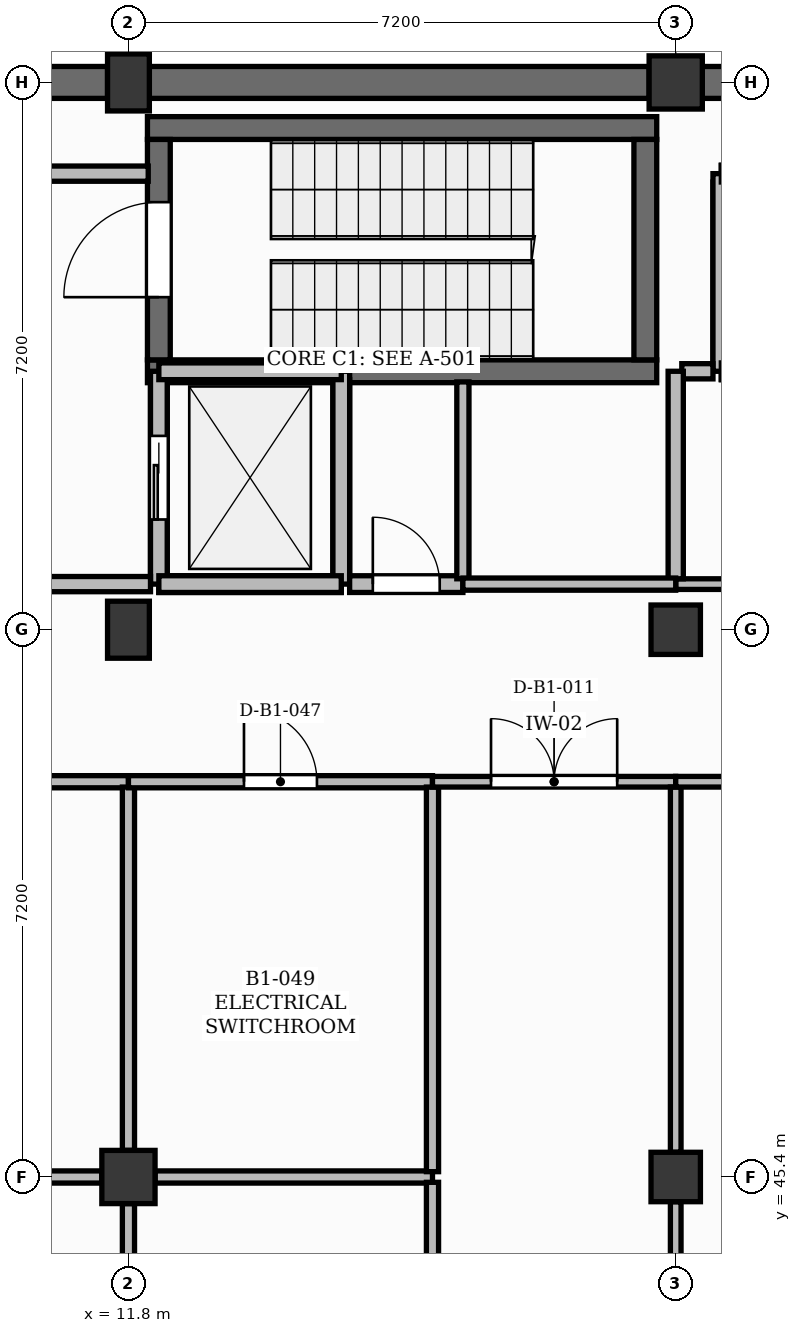
"""IFC4 building model, lengths in metres.
Left out: names, types, materials, properties, quantities, classifications, styles, units other than length and angle.
Written with IfcOpenShell. Run it as: python <this file> out.ifc"""

import sys

from ifc_helpers import new_model, si_unit, direction, frame, frame_2d, origin, origin_2d, place, context, subcontext, project, spatial, rectangle, extrude, element, fill, save


model = new_model("IFC4")
c1 = context("Model", 3, precision=1e-05, world=origin(), true_north=direction((0.0, 1.0)))
c2 = subcontext(c1, "Body", "Model", "MODEL_VIEW")
j1 = project(units=[si_unit("LENGTHUNIT", "METRE"), si_unit("PLANEANGLEUNIT", "RADIAN")], contexts=[c1])
p1 = place(None, origin())
s1 = spatial("IfcSite", under=j1, at=p1, CompositionType="ELEMENT")
p2 = place(p1, origin())
s2 = spatial("IfcBuilding", under=s1, at=p2, CompositionType="ELEMENT")
p3 = place(p2, frame((0.0, 0.0, -4.5)))
s3 = spatial("IfcBuildingStorey", under=s2, at=p3, CompositionType="ELEMENT", Elevation=-4.5)
p4 = place(p3, frame((11.8, 45.4, 0.0), z_axis=(0.0, 0.0, 1.0), x_axis=(1.0, 0.0, 0.0)))
e1 = element("IfcColumn", 1, at=p4, inside=s3, PredefinedType="COLUMN", context=c2, shape_type="SweptSolid", body=[
    extrude(rectangle(XDim=0.7, YDim=0.7, at=origin_2d()), origin(), (0.0, 0.0, 1.0), 4.2),
])
for number, where, z_axis, x_axis in (
    (2, (11.8, 52.6, 0.0), (0.0, 0.0, 1.0), (1.0, 0.0, 0.0)),
    (3, (11.8, 59.8, 0.0), (0.0, 0.0, 1.0), (1.0, 0.0, 0.0)),
):
    element("IfcColumn", number, at=place(p3, frame(where, z_axis=z_axis, x_axis=x_axis)), inside=s3, PredefinedType="COLUMN", context=c2, shape_type="SweptSolid", body=[
        extrude(rectangle(XDim=0.55, YDim=0.75, at=origin_2d()), origin(), (0.0, 0.0, 1.0), 4.2),
    ])
for number, where, z_axis, x_axis in (
    (4, (19.0, 45.4, 0.0), (0.0, 0.0, 1.0), (1.0, 0.0, 0.0)),
    (5, (19.0, 52.6, 0.0), (0.0, 0.0, 1.0), (1.0, 0.0, 0.0)),
):
    element("IfcColumn", number, at=place(p3, frame(where, z_axis=z_axis, x_axis=x_axis)), inside=s3, PredefinedType="COLUMN", context=c2, shape_type="SweptSolid", body=[
        extrude(rectangle(XDim=0.65, YDim=0.65, at=origin_2d()), origin(), (0.0, 0.0, 1.0), 4.2),
    ])
p5 = place(p3, frame((19.0, 59.8, 0.0), z_axis=(0.0, 0.0, 1.0), x_axis=(1.0, 0.0, 0.0)))
e6 = element("IfcColumn", 6, at=p5, inside=s3, PredefinedType="COLUMN", context=c2, shape_type="SweptSolid", body=[
    extrude(rectangle(XDim=0.7, YDim=0.7, at=origin_2d()), origin(), (0.0, 0.0, 1.0), 4.2),
])
p6 = place(p3, frame((8.4, 59.8, 0.0), z_axis=(0.0, 0.0, 1.0), x_axis=(1.0, 0.0, 0.0)))
e7 = element("IfcWall", 7, at=p6, inside=s3, PredefinedType="USERDEFINED", context=c2, shape_type="SweptSolid", body=[
    extrude(rectangle(XDim=3.125, YDim=0.42, at=frame_2d((1.562, 0.0))), origin(), (0.0, 0.0, 1.0), 4.2),
])
p7 = place(p3, frame((12.075, 59.8, 0.0), z_axis=(0.0, 0.0, 1.0), x_axis=(1.0, 0.0, 0.0)))
e8 = element("IfcWall", 8, at=p7, inside=s3, PredefinedType="USERDEFINED", context=c2, shape_type="SweptSolid", body=[
    extrude(rectangle(XDim=6.575, YDim=0.42, at=frame_2d((3.288, 0.0))), origin(), (0.0, 0.0, 1.0), 4.2),
])
p8 = place(p3, frame((19.35, 59.8, 0.0), z_axis=(0.0, 0.0, 1.0), x_axis=(1.0, 0.0, 0.0)))
e9 = element("IfcWall", 9, at=p8, inside=s3, PredefinedType="USERDEFINED", context=c2, shape_type="SweptSolid", body=[
    extrude(rectangle(XDim=3.05, YDim=0.42, at=frame_2d((1.525, 0.0))), origin(), (0.0, 0.0, 1.0), 4.2),
])
for number, where, z_axis, x_axis in (
    (10, (12.05, 56.0, 0.0), (0.0, 0.0, 1.0), (1.0, 0.0, 0.0)),
    (11, (12.05, 59.2, 0.0), (0.0, 0.0, 1.0), (1.0, 0.0, 0.0)),
):
    element("IfcWall", number, at=place(p3, frame(where, z_axis=z_axis, x_axis=x_axis)), inside=s3, PredefinedType="SHEAR", context=c2, shape_type="SweptSolid", body=[
        extrude(rectangle(XDim=6.7, YDim=0.3, at=frame_2d((3.35, 0.0))), origin(), (0.0, 0.0, 1.0), 4.25),
    ])
p9 = place(p3, frame((12.2, 56.15, 0.0), z_axis=(0.0, 0.0, 1.0), x_axis=(0.0, 1.0, 0.0)))
e12 = element("IfcWall", 12, at=p9, inside=s3, PredefinedType="SHEAR", context=c2, shape_type="SweptSolid", body=[
    extrude(rectangle(XDim=2.9, YDim=0.3, at=frame_2d((1.45, 0.0))), origin(), (0.0, 0.0, 1.0), 4.25),
])
p10 = place(p9, frame((0.825, 0.0, 0.0)))
e13 = element("IfcOpeningElement", 13, at=p10, cuts=e12, PredefinedType="OPENING", context=c2, shape_type="SweptSolid", body=[
    extrude(rectangle(XDim=1.25, YDim=2.15, at=frame_2d((0.625, 1.075))), frame((0.0, 0.16, 0.0), z_axis=(0.0, -1.0, 0.0), x_axis=(1.0, 0.0, 0.0)), (0.0, 0.0, 1.0), 0.32),
])
p11 = place(p3, frame((18.6, 56.15, 0.0), z_axis=(0.0, 0.0, 1.0), x_axis=(0.0, 1.0, 0.0)))
e14 = element("IfcWall", 14, at=p11, inside=s3, PredefinedType="SHEAR", context=c2, shape_type="SweptSolid", body=[
    extrude(rectangle(XDim=2.9, YDim=0.3, at=frame_2d((1.45, 0.0))), origin(), (0.0, 0.0, 1.0), 4.25),
])
p12 = place(p3, frame((12.2, 53.2, 0.0), z_axis=(0.0, 0.0, 1.0), x_axis=(1.0, 0.0, 0.0)))
e15 = element("IfcWall", 15, at=p12, inside=s3, PredefinedType="SOLIDWALL", context=c2, shape_type="SweptSolid", body=[
    extrude(rectangle(XDim=2.4, YDim=0.22, at=frame_2d((1.2, 0.0))), origin(), (0.0, 0.0, 1.0), 4.25),
])
p13 = place(p3, frame((12.2, 53.31, 0.0), z_axis=(0.0, 0.0, 1.0), x_axis=(0.0, 1.0, 0.0)))
e16 = element("IfcWall", 16, at=p13, inside=s3, PredefinedType="SOLIDWALL", context=c2, shape_type="SweptSolid", body=[
    extrude(rectangle(XDim=2.58, YDim=0.22, at=frame_2d((1.29, 0.0))), origin(), (0.0, 0.0, 1.0), 4.25),
])
p14 = place(p13, frame((0.74, 0.0, 0.0)))
e17 = element("IfcOpeningElement", 17, at=p14, cuts=e16, PredefinedType="OPENING", context=c2, shape_type="SweptSolid", body=[
    extrude(rectangle(XDim=1.1, YDim=2.15, at=frame_2d((0.55, 1.075))), frame((0.0, 0.12, 0.0), z_axis=(0.0, -1.0, 0.0), x_axis=(1.0, 0.0, 0.0)), (0.0, 0.0, 1.0), 0.24),
])
p15 = place(p3, frame((14.6, 53.31, 0.0), z_axis=(0.0, 0.0, 1.0), x_axis=(0.0, 1.0, 0.0)))
e18 = element("IfcWall", 18, at=p15, inside=s3, PredefinedType="SOLIDWALL", context=c2, shape_type="SweptSolid", body=[
    extrude(rectangle(XDim=2.58, YDim=0.22, at=frame_2d((1.29, 0.0))), origin(), (0.0, 0.0, 1.0), 4.25),
])
for number, where, z_axis, x_axis in (
    (19, (12.2, 53.2, -0.9), (0.0, 0.0, 1.0), (0.0, 1.0, 0.0)),
    (20, (14.6, 53.2, -0.9), (0.0, 0.0, 1.0), (0.0, 1.0, 0.0)),
):
    element("IfcWall", number, at=place(p3, frame(where, z_axis=z_axis, x_axis=x_axis)), inside=s3, PredefinedType="SOLIDWALL", context=c2, shape_type="SweptSolid", body=[
        extrude(rectangle(XDim=2.8, YDim=0.22, at=frame_2d((1.4, 0.0))), origin(), (0.0, 0.0, 1.0), 0.9),
    ])
for number, where, z_axis, x_axis in (
    (21, (12.2, 53.2, -0.9), (0.0, 0.0, 1.0), (1.0, 0.0, 0.0)),
    (22, (12.2, 56.0, -0.9), (0.0, 0.0, 1.0), (1.0, 0.0, 0.0)),
):
    element("IfcWall", number, at=place(p3, frame(where, z_axis=z_axis, x_axis=x_axis)), inside=s3, PredefinedType="SOLIDWALL", context=c2, shape_type="SweptSolid", body=[
        extrude(rectangle(XDim=2.4, YDim=0.22, at=frame_2d((1.2, 0.0))), origin(), (0.0, 0.0, 1.0), 0.9),
    ])
p16 = place(p3, frame((19.6, 56.11, 0.0), z_axis=(0.0, 0.0, 1.0), x_axis=(0.0, 1.0, 0.0)))
e23 = element("IfcWall", 23, at=p16, inside=s3, PredefinedType="SOLIDWALL", context=c2, shape_type="SweptSolid", body=[
    extrude(rectangle(XDim=2.38, YDim=0.22, at=frame_2d((1.19, 0.0))), origin(), (0.0, 0.0, 1.0), 4.25),
])
p17 = place(p3, frame((19.6, 56.0, -0.9), z_axis=(0.0, 0.0, 1.0), x_axis=(0.0, 1.0, 0.0)))
e24 = element("IfcWall", 24, at=p17, inside=s3, PredefinedType="SOLIDWALL", context=c2, shape_type="SweptSolid", body=[
    extrude(rectangle(XDim=2.6, YDim=0.22, at=frame_2d((1.3, 0.0))), origin(), (0.0, 0.0, 1.0), 0.9),
])
p18 = place(p3, frame((4.925, 45.4, 0.0), z_axis=(0.0, 0.0, 1.0), x_axis=(1.0, 0.0, 0.0)))
e25 = element("IfcWall", 25, at=p18, inside=s3, PredefinedType="PARTITIONING", context=c2, shape_type="SweptSolid", body=[
    extrude(rectangle(XDim=6.525, YDim=0.16, at=frame_2d((3.262, 0.0))), origin(), (0.0, 0.0, 1.0), 3.6),
])
p19 = place(p3, frame((4.6, 50.6, 0.0), z_axis=(0.0, 0.0, 1.0), x_axis=(1.0, 0.0, 0.0)))
e26 = element("IfcWall", 26, at=p19, inside=s3, PredefinedType="PARTITIONING", context=c2, shape_type="SweptSolid", body=[
    extrude(rectangle(XDim=7.2, YDim=0.16, at=frame_2d((3.6, 0.0))), origin(), (0.0, 0.0, 1.0), 4.08),
])
p20 = place(p19, frame((3.12, 0.0, 0.0)))
e27 = element("IfcOpeningElement", 27, at=p20, cuts=e26, PredefinedType="OPENING", context=c2, shape_type="SweptSolid", body=[
    extrude(rectangle(XDim=0.96, YDim=2.1, at=frame_2d((0.48, 1.05))), frame((0.0, 0.09, 0.0), z_axis=(0.0, -1.0, 0.0), x_axis=(1.0, 0.0, 0.0)), (0.0, 0.0, 1.0), 0.18),
])
p21 = place(p3, frame((7.8, 53.2, 0.0), z_axis=(0.0, 0.0, 1.0), x_axis=(1.0, 0.0, 0.0)))
e28 = element("IfcWall", 28, at=p21, inside=s3, PredefinedType="PARTITIONING", context=c2, shape_type="SweptSolid", body=[
    extrude(rectangle(XDim=4.29, YDim=0.2, at=frame_2d((2.145, 0.0))), origin(), (0.0, 0.0, 1.0), 4.08),
])
p22 = place(p21, frame((1.405, 0.0, 0.0)))
e29 = element("IfcOpeningElement", 29, at=p22, cuts=e28, PredefinedType="OPENING", context=c2, shape_type="SweptSolid", body=[
    extrude(rectangle(XDim=1.48, YDim=2.25, at=frame_2d((0.74, 1.125))), frame((0.0, 0.11, 0.0), z_axis=(0.0, -1.0, 0.0), x_axis=(1.0, 0.0, 0.0)), (0.0, 0.0, 1.0), 0.22),
])
p23 = place(p3, frame((11.8, 38.52, 0.0), z_axis=(0.0, 0.0, 1.0), x_axis=(0.0, 1.0, 0.0)))
e30 = element("IfcWall", 30, at=p23, inside=s3, PredefinedType="PARTITIONING", context=c2, shape_type="SweptSolid", body=[
    extrude(rectangle(XDim=6.53, YDim=0.16, at=frame_2d((3.265, 0.0))), origin(), (0.0, 0.0, 1.0), 3.5),
])
p24 = place(p3, frame((11.8, 45.75, 0.0), z_axis=(0.0, 0.0, 1.0), x_axis=(0.0, 1.0, 0.0)))
e31 = element("IfcWall", 31, at=p24, inside=s3, PredefinedType="PARTITIONING", context=c2, shape_type="SweptSolid", body=[
    extrude(rectangle(XDim=4.78, YDim=0.16, at=frame_2d((2.39, 0.0))), origin(), (0.0, 0.0, 1.0), 3.5),
])
p25 = place(p3, frame((12.15, 45.4, 0.0), z_axis=(0.0, 0.0, 1.0), x_axis=(1.0, 0.0, 0.0)))
e32 = element("IfcWall", 32, at=p25, inside=s3, PredefinedType="PARTITIONING", context=c2, shape_type="SweptSolid", body=[
    extrude(rectangle(XDim=3.65, YDim=0.16, at=frame_2d((1.825, 0.0))), origin(), (0.0, 0.0, 1.0), 3.6),
])
p26 = place(p3, frame((11.8, 50.6, 0.0), z_axis=(0.0, 0.0, 1.0), x_axis=(1.0, 0.0, 0.0)))
e33 = element("IfcWall", 33, at=p26, inside=s3, PredefinedType="PARTITIONING", context=c2, shape_type="SweptSolid", body=[
    extrude(rectangle(XDim=4.0, YDim=0.16, at=frame_2d((2.0, 0.0))), origin(), (0.0, 0.0, 1.0), 4.08),
])
p27 = place(p26, frame((1.52, 0.0, 0.0)))
e34 = element("IfcOpeningElement", 34, at=p27, cuts=e33, PredefinedType="OPENING", context=c2, shape_type="SweptSolid", body=[
    extrude(rectangle(XDim=0.96, YDim=2.1, at=frame_2d((0.48, 1.05))), frame((0.0, 0.09, 0.0), z_axis=(0.0, -1.0, 0.0), x_axis=(1.0, 0.0, 0.0)), (0.0, 0.0, 1.0), 0.18),
])
p28 = place(p3, frame((14.71, 53.2, 0.0), z_axis=(0.0, 0.0, 1.0), x_axis=(1.0, 0.0, 0.0)))
e35 = element("IfcWall", 35, at=p28, inside=s3, PredefinedType="SOLIDWALL", context=c2, shape_type="SweptSolid", body=[
    extrude(rectangle(XDim=1.49, YDim=0.22, at=frame_2d((0.745, 0.0))), origin(), (0.0, 0.0, 1.0), 4.08),
])
p29 = place(p28, frame((0.305, 0.0, 0.0)))
e36 = element("IfcOpeningElement", 36, at=p29, cuts=e35, PredefinedType="OPENING", context=c2, shape_type="SweptSolid", body=[
    extrude(rectangle(XDim=0.88, YDim=2.05, at=frame_2d((0.44, 1.025))), frame((0.0, 0.12, 0.0), z_axis=(0.0, -1.0, 0.0), x_axis=(1.0, 0.0, 0.0)), (0.0, 0.0, 1.0), 0.24),
])
p30 = place(p3, frame((15.8, 38.52, 0.0), z_axis=(0.0, 0.0, 1.0), x_axis=(0.0, 1.0, 0.0)))
e37 = element("IfcWall", 37, at=p30, inside=s3, PredefinedType="PARTITIONING", context=c2, shape_type="SweptSolid", body=[
    extrude(rectangle(XDim=6.81, YDim=0.16, at=frame_2d((3.405, 0.0))), origin(), (0.0, 0.0, 1.0), 4.08),
])
p31 = place(p3, frame((15.8, 45.47, 0.0), z_axis=(0.0, 0.0, 1.0), x_axis=(0.0, 1.0, 0.0)))
e38 = element("IfcWall", 38, at=p31, inside=s3, PredefinedType="PARTITIONING", context=c2, shape_type="SweptSolid", body=[
    extrude(rectangle(XDim=5.06, YDim=0.16, at=frame_2d((2.53, 0.0))), origin(), (0.0, 0.0, 1.0), 4.08),
])
p32 = place(p3, frame((15.8, 50.6, 0.0), z_axis=(0.0, 0.0, 1.0), x_axis=(1.0, 0.0, 0.0)))
e39 = element("IfcWall", 39, at=p32, inside=s3, PredefinedType="PARTITIONING", context=c2, shape_type="SweptSolid", body=[
    extrude(rectangle(XDim=3.2, YDim=0.14, at=frame_2d((1.6, 0.0))), origin(), (0.0, 0.0, 1.0), 4.08),
])
p33 = place(p32, frame((0.77, 0.0, 0.0)))
e40 = element("IfcOpeningElement", 40, at=p33, cuts=e39, PredefinedType="OPENING", context=c2, shape_type="SweptSolid", body=[
    extrude(rectangle(XDim=1.66, YDim=2.3, at=frame_2d((0.83, 1.15))), frame((0.0, 0.08, 0.0), z_axis=(0.0, -1.0, 0.0), x_axis=(1.0, 0.0, 0.0)), (0.0, 0.0, 1.0), 0.16),
])
p34 = place(p3, frame((19.0, 37.15, 0.0), z_axis=(0.0, 0.0, 1.0), x_axis=(0.0, 1.0, 0.0)))
e41 = element("IfcWall", 41, at=p34, inside=s3, PredefinedType="PARTITIONING", context=c2, shape_type="SweptSolid", body=[
    extrude(rectangle(XDim=7.925, YDim=0.14, at=frame_2d((3.962, 0.0))), origin(), (0.0, 0.0, 1.0), 3.5),
])
p35 = place(p3, frame((19.0, 45.725, 0.0), z_axis=(0.0, 0.0, 1.0), x_axis=(0.0, 1.0, 0.0)))
e42 = element("IfcWall", 42, at=p35, inside=s3, PredefinedType="PARTITIONING", context=c2, shape_type="SweptSolid", body=[
    extrude(rectangle(XDim=4.805, YDim=0.14, at=frame_2d((2.402, 0.0))), origin(), (0.0, 0.0, 1.0), 3.5),
])
p36 = place(p3, frame((19.0, 50.6, 0.0), z_axis=(0.0, 0.0, 1.0), x_axis=(1.0, 0.0, 0.0)))
e43 = element("IfcWall", 43, at=p36, inside=s3, PredefinedType="PARTITIONING", context=c2, shape_type="SweptSolid", body=[
    extrude(rectangle(XDim=2.8, YDim=0.14, at=frame_2d((1.4, 0.0))), origin(), (0.0, 0.0, 1.0), 4.08),
])
p37 = place(p36, frame((0.63, 0.0, 0.0)))
e44 = element("IfcOpeningElement", 44, at=p37, cuts=e43, PredefinedType="OPENING", context=c2, shape_type="SweptSolid", body=[
    extrude(rectangle(XDim=1.54, YDim=2.25, at=frame_2d((0.77, 1.125))), frame((0.0, 0.08, 0.0), z_axis=(0.0, -1.0, 0.0), x_axis=(1.0, 0.0, 0.0)), (0.0, 0.0, 1.0), 0.16),
])
p38 = place(p3, frame((19.0, 53.2, 0.0), z_axis=(0.0, 0.0, 1.0), x_axis=(1.0, 0.0, 0.0)))
e45 = element("IfcWall", 45, at=p38, inside=s3, PredefinedType="PARTITIONING", context=c2, shape_type="SweptSolid", body=[
    extrude(rectangle(XDim=5.4, YDim=0.14, at=frame_2d((2.7, 0.0))), origin(), (0.0, 0.0, 1.0), 4.08),
])
p39 = place(p38, frame((2.24, 0.0, 0.0)))
e46 = element("IfcOpeningElement", 46, at=p39, cuts=e45, PredefinedType="OPENING", context=c2, shape_type="SweptSolid", body=[
    extrude(rectangle(XDim=0.92, YDim=2.1, at=frame_2d((0.46, 1.05))), frame((0.0, 0.08, 0.0), z_axis=(0.0, -1.0, 0.0), x_axis=(1.0, 0.0, 0.0)), (0.0, 0.0, 1.0), 0.16),
])
p40 = place(p38, frame((3.47, 0.0, 0.0)))
e47 = element("IfcOpeningElement", 47, at=p40, cuts=e45, PredefinedType="OPENING", context=c2, shape_type="SweptSolid", body=[
    extrude(rectangle(XDim=1.1, YDim=2.1, at=frame_2d((0.55, 1.05))), frame((0.0, 0.08, 0.0), z_axis=(0.0, -1.0, 0.0), x_axis=(1.0, 0.0, 0.0)), (0.0, 0.0, 1.0), 0.16),
])
p41 = place(p3, frame((16.2, 53.27, 0.0), z_axis=(0.0, 0.0, 1.0), x_axis=(0.0, 1.0, 0.0)))
e48 = element("IfcWall", 48, at=p41, inside=s3, PredefinedType="PARTITIONING", context=c2, shape_type="SweptSolid", body=[
    extrude(rectangle(XDim=2.59, YDim=0.16, at=frame_2d((1.295, 0.0))), origin(), (0.0, 0.0, 1.0), 4.08),
])
p42 = place(p3, frame((12.06, 58.6, 0.0), z_axis=(0.0, 0.0, 1.0), x_axis=(-1.0, 0.0, 0.0)))
e49 = element("IfcWall", 49, at=p42, inside=s3, PredefinedType="PARTITIONING", context=c2, shape_type="SweptSolid", body=[
    extrude(rectangle(XDim=4.26, YDim=0.2, at=frame_2d((2.13, 0.0))), origin(), (0.0, 0.0, 1.0), 4.08),
])
p43 = place(p3, frame((19.49, 56.0, 0.0), z_axis=(0.0, 0.0, 1.0), x_axis=(-1.0, 0.0, 0.0)))
e50 = element("IfcWall", 50, at=p43, inside=s3, PredefinedType="PARTITIONING", context=c2, shape_type="SweptSolid", body=[
    extrude(rectangle(XDim=0.41, YDim=0.2, at=frame_2d((0.205, 0.0))), origin(), (0.0, 0.0, 1.0), 4.08),
])
p44 = place(p3, frame((19.0, 53.27, 0.0), z_axis=(0.0, 0.0, 1.0), x_axis=(0.0, 1.0, 0.0)))
e51 = element("IfcWall", 51, at=p44, inside=s3, PredefinedType="PARTITIONING", context=c2, shape_type="SweptSolid", body=[
    extrude(rectangle(XDim=2.73, YDim=0.2, at=frame_2d((1.365, 0.0))), origin(), (0.0, 0.0, 1.0), 3.5),
])
p45 = place(p3, frame((19.0, 53.2, 0.0), z_axis=(0.0, 0.0, 1.0), x_axis=(-1.0, 0.0, 0.0)))
e52 = element("IfcWall", 52, at=p45, inside=s3, PredefinedType="PARTITIONING", context=c2, shape_type="SweptSolid", body=[
    extrude(rectangle(XDim=2.8, YDim=0.16, at=frame_2d((1.4, 0.0))), origin(), (0.0, 0.0, 1.0), 4.08),
])
p46 = place(p14, origin())
e53 = element("IfcDoor", 53, at=p46, inside=s3, OperationType="SLIDING_TO_LEFT", PredefinedType="DOOR", context=c2, shape_type="SweptSolid", body=[
    extrude(rectangle(XDim=1.1, YDim=2.15, at=frame_2d((0.55, 1.075))), frame((0.0, 0.025, 0.0), z_axis=(0.0, -1.0, 0.0), x_axis=(1.0, 0.0, 0.0)), (0.0, 0.0, 1.0), 0.05),
])
fill(e17, e53)
p47 = place(p10, origin())
e54 = element("IfcDoor", 54, at=p47, inside=s3, OperationType="SINGLE_SWING_LEFT", PredefinedType="DOOR", context=c2, shape_type="SweptSolid", body=[
    extrude(rectangle(XDim=1.25, YDim=2.15, at=frame_2d((0.625, 1.075))), frame((0.0, 0.025, 0.0), z_axis=(0.0, -1.0, 0.0), x_axis=(1.0, 0.0, 0.0)), (0.0, 0.0, 1.0), 0.05),
])
fill(e13, e54)
p48 = place(p33, origin())
e55 = element("IfcDoor", 55, at=p48, inside=s3, OperationType="DOUBLE_DOOR_SINGLE_SWING", PredefinedType="DOOR", context=c2, shape_type="SweptSolid", body=[
    extrude(rectangle(XDim=1.66, YDim=2.3, at=frame_2d((0.83, 1.15))), frame((0.0, 0.025, 0.0), z_axis=(0.0, -1.0, 0.0), x_axis=(1.0, 0.0, 0.0)), (0.0, 0.0, 1.0), 0.05),
])
fill(e40, e55)
p49 = place(p29, origin())
e56 = element("IfcDoor", 56, at=p49, inside=s3, OperationType="SINGLE_SWING_LEFT", PredefinedType="DOOR", context=c2, shape_type="SweptSolid", body=[
    extrude(rectangle(XDim=0.88, YDim=2.05, at=frame_2d((0.44, 1.025))), frame((0.0, 0.025, 0.0), z_axis=(0.0, -1.0, 0.0), x_axis=(1.0, 0.0, 0.0)), (0.0, 0.0, 1.0), 0.05),
])
fill(e36, e56)
p50 = place(p27, origin())
e57 = element("IfcDoor", 57, at=p50, inside=s3, OperationType="SINGLE_SWING_LEFT", PredefinedType="DOOR", context=c2, shape_type="SweptSolid", body=[
    extrude(rectangle(XDim=0.96, YDim=2.1, at=frame_2d((0.48, 1.05))), frame((0.0, 0.025, 0.0), z_axis=(0.0, -1.0, 0.0), x_axis=(1.0, 0.0, 0.0)), (0.0, 0.0, 1.0), 0.05),
])
fill(e34, e57)
save(model, sys.argv[1])
